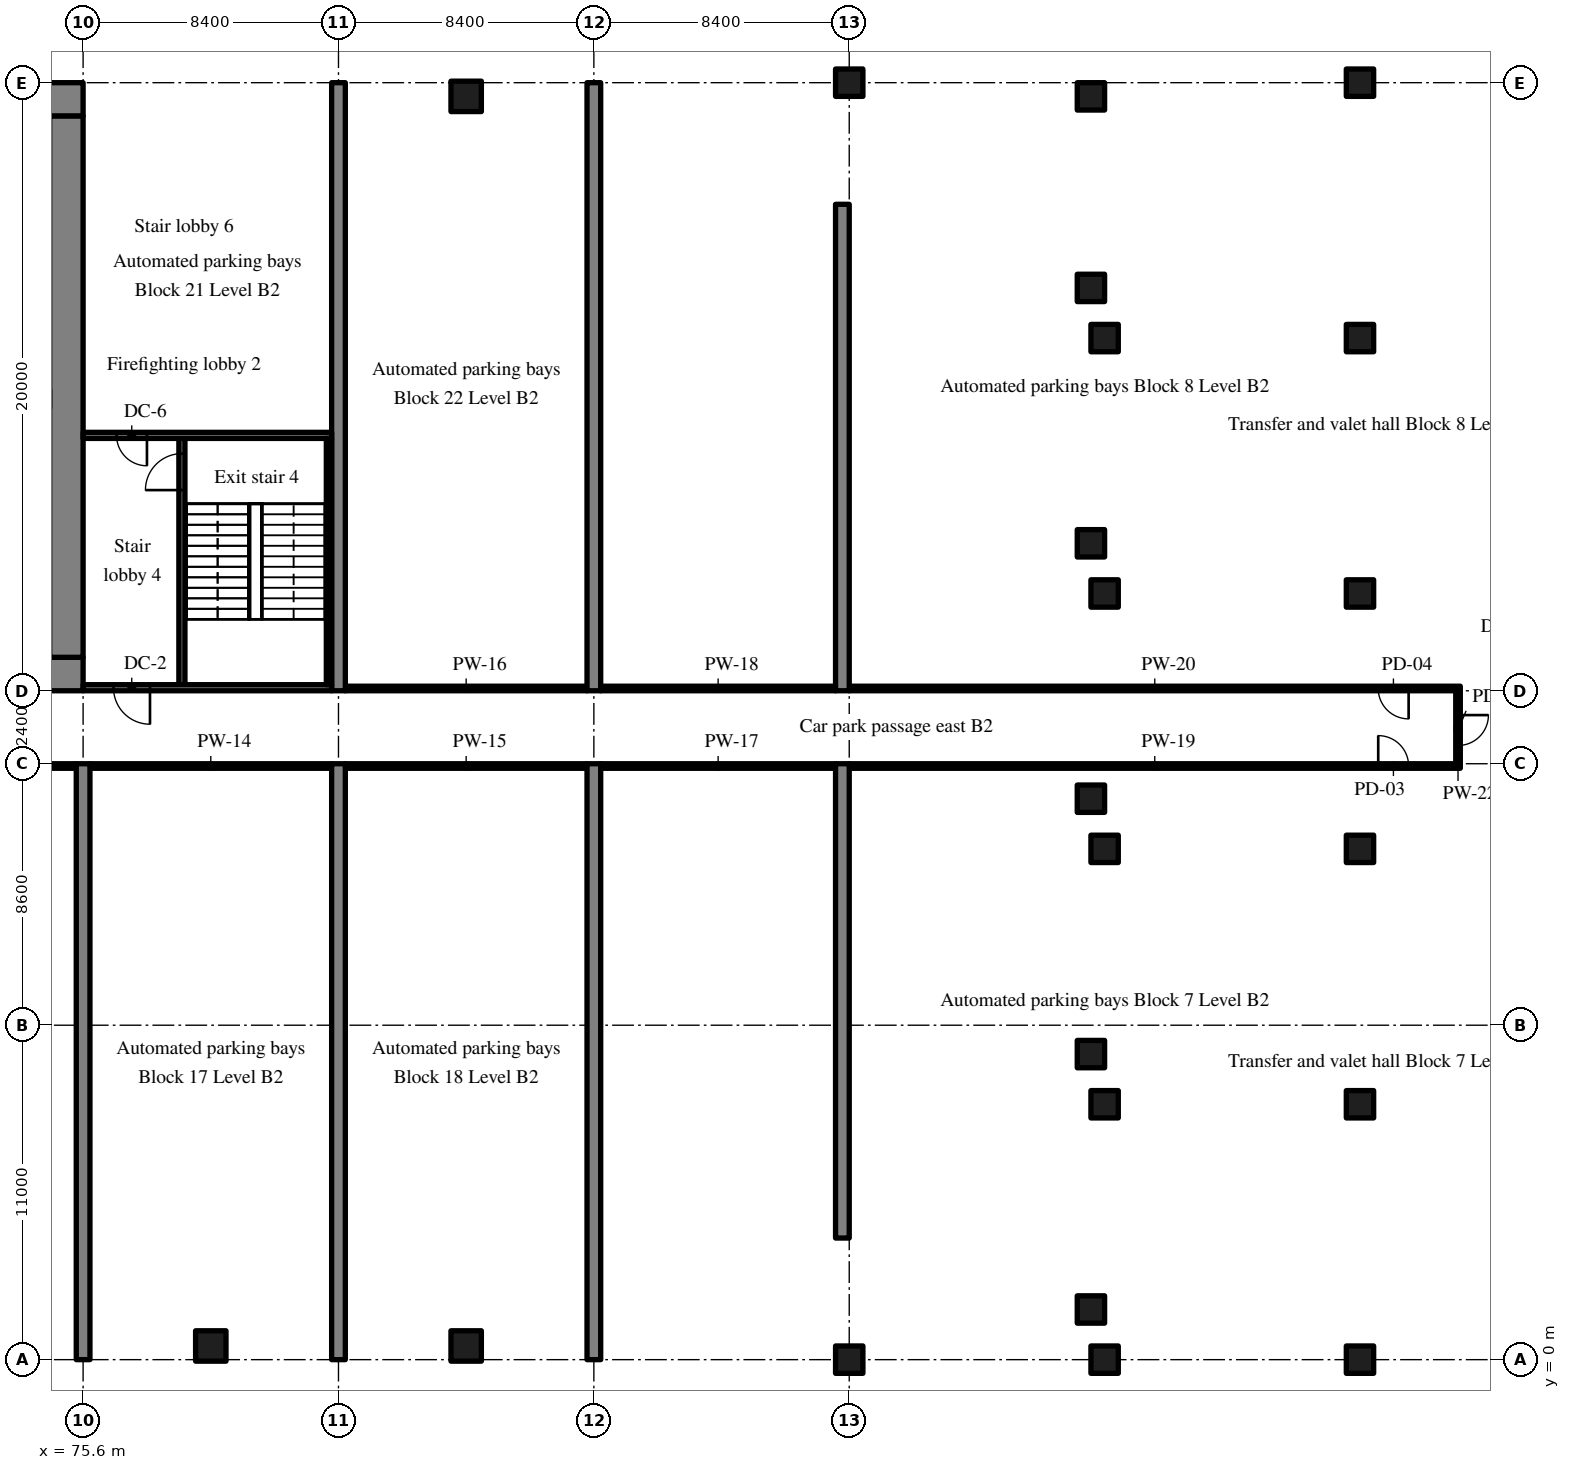
"""IFC4 building model, lengths in metres.
Left out: names, types, materials, properties, quantities, classifications, styles, units other than length and angle.
Written with IfcOpenShell. Run it as: python <this file> out.ifc"""

import sys

from ifc_helpers import new_model, si_unit, direction, frame, frame_2d, origin, origin_2d, place, context, subcontext, project, spatial, rectangle, extrude, source, transform, mapped, element, fill, save


model = new_model("IFC4")
c1 = context("Model", 3, precision=1e-05, world=origin(), true_north=direction((0.0, 1.0)))
c2 = subcontext(c1, "Body", "Model", "MODEL_VIEW")
j1 = project(units=[si_unit("LENGTHUNIT", "METRE"), si_unit("PLANEANGLEUNIT", "RADIAN")], contexts=[c1])
p1 = place(None, origin())
s1 = spatial("IfcSite", under=j1, at=p1, CompositionType="ELEMENT")
p2 = place(p1, origin())
s2 = spatial("IfcBuilding", under=s1, at=p2, CompositionType="ELEMENT")
p3 = place(p2, frame((0.0, 0.0, -9.0)))
s3 = spatial("IfcBuildingStorey", under=s2, at=p3, CompositionType="ELEMENT", Elevation=-9.0)
m1 = source(origin(), c2, "Body", "SweptSolid", [
    extrude(rectangle(XDim=50.4, YDim=1.1, at=frame_2d((25.2, 0.0))), origin(), (0.0, 0.0, 1.0), 4.22),
])
p4 = place(p3, frame((25.2, 22.55, 0.0), z_axis=(0.0, 0.0, 1.0), x_axis=(1.0, 0.0, 0.0)))
e1 = element("IfcWall", 1, at=p4, inside=s3, PredefinedType="SHEAR", context=c2, shape_type="MappedRepresentation", body=[
    mapped(m1, transform((0.0, 0.0, 0.0), scale=1.0)),
])
m2 = source(origin(), c2, "Body", "SweptSolid", [
    extrude(rectangle(XDim=1.8, YDim=2.1, at=frame_2d((0.9, 1.05))), frame((0.0, 0.56, 0.0), z_axis=(0.0, -1.0, 0.0), x_axis=(1.0, 0.0, 0.0)), (0.0, 0.0, 1.0), 1.12),
])
p5 = place(p4, frame((15.9, 0.0, 0.0)))
e2 = element("IfcOpeningElement", 2, at=p5, cuts=e1, PredefinedType="OPENING", context=c2, shape_type="MappedRepresentation", body=[
    mapped(m2, transform((0.0, 0.0, 0.0), scale=1.0)),
])
m3 = source(origin(), c2, "Body", "SweptSolid", [
    extrude(rectangle(XDim=1.2, YDim=2.1, at=frame_2d((0.6, 1.05))), frame((0.0, 0.56, 0.0), z_axis=(0.0, -1.0, 0.0), x_axis=(1.0, 0.0, 0.0)), (0.0, 0.0, 1.0), 1.12),
])
p6 = place(p4, frame((27.0, 0.0, 0.0)))
e3 = element("IfcOpeningElement", 3, at=p6, cuts=e1, PredefinedType="OPENING", context=c2, shape_type="MappedRepresentation", body=[
    mapped(m3, transform((0.0, 0.0, 0.0), scale=1.0)),
])
m4 = source(origin(), c2, "Body", "SweptSolid", [
    extrude(rectangle(XDim=0.9, YDim=2.1, at=frame_2d((0.45, 1.05))), frame((0.0, 0.56, 0.0), z_axis=(0.0, -1.0, 0.0), x_axis=(1.0, 0.0, 0.0)), (0.0, 0.0, 1.0), 1.12),
])
p7 = place(p4, frame((33.75, 0.0, 0.0)))
e4 = element("IfcOpeningElement", 4, at=p7, cuts=e1, PredefinedType="OPENING", context=c2, shape_type="MappedRepresentation", body=[
    mapped(m4, transform((0.0, 0.0, 0.0), scale=1.0)),
])
p8 = place(p4, frame((30.75, 0.0, 0.0)))
e5 = element("IfcOpeningElement", 5, at=p8, cuts=e1, PredefinedType="OPENING", context=c2, shape_type="MappedRepresentation", body=[
    mapped(m4, transform((0.0, 0.0, 0.0), scale=1.0)),
])
p9 = place(p4, frame((38.25, 0.0, 0.0)))
e6 = element("IfcOpeningElement", 6, at=p9, cuts=e1, PredefinedType="OPENING", context=c2, shape_type="MappedRepresentation", body=[
    mapped(m4, transform((0.0, 0.0, 0.0), scale=1.0)),
])
p10 = place(p4, frame((6.425, 0.0, 0.0)))
e7 = element("IfcOpeningElement", 7, at=p10, cuts=e1, PredefinedType="OPENING", context=c2, shape_type="MappedRepresentation", body=[
    mapped(m3, transform((0.0, 0.0, 0.0), scale=1.0)),
])
p11 = place(p4, frame((47.675, 0.0, 0.0)))
e8 = element("IfcOpeningElement", 8, at=p11, cuts=e1, PredefinedType="OPENING", context=c2, shape_type="MappedRepresentation", body=[
    mapped(m3, transform((0.0, 0.0, 0.0), scale=1.0)),
])
p12 = place(p3, frame((25.2, 41.45, 0.0), z_axis=(0.0, 0.0, 1.0), x_axis=(1.0, 0.0, 0.0)))
e9 = element("IfcWall", 9, at=p12, inside=s3, PredefinedType="SHEAR", context=c2, shape_type="MappedRepresentation", body=[
    mapped(m1, transform((0.0, 0.0, 0.0), scale=1.0)),
])
m5 = source(origin(), c2, "Body", "SweptSolid", [
    extrude(rectangle(XDim=17.8, YDim=1.1, at=frame_2d((8.9, 0.0))), origin(), (0.0, 0.0, 1.0), 4.22),
])
p13 = place(p3, frame((75.05, 23.1, 0.0), z_axis=(0.0, 0.0, 1.0), x_axis=(0.0, 1.0, 0.0)))
e10 = element("IfcWall", 10, at=p13, inside=s3, PredefinedType="SHEAR", context=c2, shape_type="MappedRepresentation", body=[
    mapped(m5, transform((0.0, 0.0, 0.0), scale=1.0)),
])
m6 = source(origin(), c2, "Body", "SweptSolid", [
    extrude(rectangle(XDim=19.6, YDim=0.45, at=frame_2d((9.8, 0.0))), origin(), (0.0, 0.0, 1.0), 4.22),
])
for number, where, z_axis, x_axis in (
    (11, (75.6, 0.0, 0.0), (0.0, 0.0, 1.0), (0.0, 1.0, 0.0)),
    (12, (84.0, 0.0, 0.0), (0.0, 0.0, 1.0), (0.0, 1.0, 0.0)),
):
    element("IfcWall", number, at=place(p3, frame(where, z_axis=z_axis, x_axis=x_axis)), inside=s3, PredefinedType="SHEAR", context=c2, shape_type="MappedRepresentation", body=[
        mapped(m6, transform((0.0, 0.0, 0.0), scale=1.0)),
    ])
m7 = source(origin(), c2, "Body", "SweptSolid", [
    extrude(rectangle(XDim=20.0, YDim=0.45, at=frame_2d((10.0, 0.0))), origin(), (0.0, 0.0, 1.0), 4.22),
])
p14 = place(p3, frame((84.0, 22.0, 0.0), z_axis=(0.0, 0.0, 1.0), x_axis=(0.0, 1.0, 0.0)))
e13 = element("IfcWall", 13, at=p14, inside=s3, PredefinedType="SHEAR", context=c2, shape_type="MappedRepresentation", body=[
    mapped(m7, transform((0.0, 0.0, 0.0), scale=1.0)),
])
p15 = place(p3, frame((92.4, 0.0, 0.0), z_axis=(0.0, 0.0, 1.0), x_axis=(0.0, 1.0, 0.0)))
e14 = element("IfcWall", 14, at=p15, inside=s3, PredefinedType="SHEAR", context=c2, shape_type="MappedRepresentation", body=[
    mapped(m6, transform((0.0, 0.0, 0.0), scale=1.0)),
])
p16 = place(p3, frame((92.4, 22.0, 0.0), z_axis=(0.0, 0.0, 1.0), x_axis=(0.0, 1.0, 0.0)))
e15 = element("IfcWall", 15, at=p16, inside=s3, PredefinedType="SHEAR", context=c2, shape_type="MappedRepresentation", body=[
    mapped(m7, transform((0.0, 0.0, 0.0), scale=1.0)),
])
m8 = source(origin(), c2, "Body", "SweptSolid", [
    extrude(rectangle(XDim=15.6, YDim=0.45, at=frame_2d((7.8, 0.0))), origin(), (0.0, 0.0, 1.0), 4.22),
])
p17 = place(p3, frame((100.575, 4.0, 0.0), z_axis=(0.0, 0.0, 1.0), x_axis=(0.0, 1.0, 0.0)))
e16 = element("IfcWall", 16, at=p17, inside=s3, PredefinedType="SHEAR", context=c2, shape_type="MappedRepresentation", body=[
    mapped(m8, transform((0.0, 0.0, 0.0), scale=1.0)),
])
m9 = source(origin(), c2, "Body", "SweptSolid", [
    extrude(rectangle(XDim=16.0, YDim=0.45, at=frame_2d((8.0, 0.0))), origin(), (0.0, 0.0, 1.0), 4.22),
])
p18 = place(p3, frame((100.575, 22.0, 0.0), z_axis=(0.0, 0.0, 1.0), x_axis=(0.0, 1.0, 0.0)))
e17 = element("IfcWall", 17, at=p18, inside=s3, PredefinedType="SHEAR", context=c2, shape_type="MappedRepresentation", body=[
    mapped(m9, transform((0.0, 0.0, 0.0), scale=1.0)),
])
m10 = source(origin(), c2, "Body", "SweptSolid", [
    extrude(rectangle(XDim=1.0, YDim=1.0, at=origin_2d()), origin(), (0.0, 0.0, 1.0), 4.22),
])
for number, where, z_axis, x_axis in (
    (18, (79.8, 0.45, 0.0), (0.0, 0.0, 1.0), (1.0, 0.0, 0.0)),
    (19, (88.2, 0.45, 0.0), (0.0, 0.0, 1.0), (1.0, 0.0, 0.0)),
    (20, (88.2, 41.55, 0.0), (0.0, 0.0, 1.0), (1.0, 0.0, 0.0)),
):
    element("IfcColumn", number, at=place(p3, frame(where, z_axis=z_axis, x_axis=x_axis)), inside=s3, PredefinedType="COLUMN", context=c2, shape_type="MappedRepresentation", body=[
        mapped(m10, transform((0.0, 0.0, 0.0), scale=1.0)),
    ])
m11 = source(origin(), c2, "Body", "SweptSolid", [
    extrude(rectangle(XDim=0.9, YDim=0.9, at=origin_2d()), origin(), (0.0, 0.0, 1.0), 4.22),
])
for number, where, z_axis, x_axis in (
    (21, (108.75, 1.65, 0.0), (0.0, 0.0, 1.0), (1.0, 0.0, 0.0)),
    (22, (108.75, 10.05, 0.0), (0.0, 0.0, 1.0), (1.0, 0.0, 0.0)),
    (23, (108.75, 18.45, 0.0), (0.0, 0.0, 1.0), (1.0, 0.0, 0.0)),
    (24, (108.75, 26.85, 0.0), (0.0, 0.0, 1.0), (1.0, 0.0, 0.0)),
    (25, (108.75, 35.25, 0.0), (0.0, 0.0, 1.0), (1.0, 0.0, 0.0)),
    (26, (108.75, 41.55, 0.0), (0.0, 0.0, 1.0), (1.0, 0.0, 0.0)),
    (27, (100.8, 0.0, 0.0), (0.0, 0.0, 1.0), (1.0, 0.0, 0.0)),
    (28, (100.8, 42.0, 0.0), (0.0, 0.0, 1.0), (1.0, 0.0, 0.0)),
    (29, (109.2, 0.0, 0.0), (0.0, 0.0, 1.0), (1.0, 0.0, 0.0)),
    (30, (109.2, 8.4, 0.0), (0.0, 0.0, 1.0), (1.0, 0.0, 0.0)),
    (31, (109.2, 16.8, 0.0), (0.0, 0.0, 1.0), (1.0, 0.0, 0.0)),
    (32, (109.2, 25.2, 0.0), (0.0, 0.0, 1.0), (1.0, 0.0, 0.0)),
    (33, (109.2, 33.6, 0.0), (0.0, 0.0, 1.0), (1.0, 0.0, 0.0)),
    (34, (117.6, 0.0, 0.0), (0.0, 0.0, 1.0), (1.0, 0.0, 0.0)),
    (35, (117.6, 8.4, 0.0), (0.0, 0.0, 1.0), (1.0, 0.0, 0.0)),
    (36, (117.6, 16.8, 0.0), (0.0, 0.0, 1.0), (1.0, 0.0, 0.0)),
    (37, (117.6, 25.2, 0.0), (0.0, 0.0, 1.0), (1.0, 0.0, 0.0)),
    (38, (117.6, 33.6, 0.0), (0.0, 0.0, 1.0), (1.0, 0.0, 0.0)),
    (39, (117.6, 42.0, 0.0), (0.0, 0.0, 1.0), (1.0, 0.0, 0.0)),
):
    element("IfcColumn", number, at=place(p3, frame(where, z_axis=z_axis, x_axis=x_axis)), inside=s3, PredefinedType="COLUMN", context=c2, shape_type="MappedRepresentation", body=[
        mapped(m11, transform((0.0, 0.0, 0.0), scale=1.0)),
    ])
m12 = source(origin(), c2, "Body", "SweptSolid", [
    extrude(rectangle(XDim=8.3, YDim=0.2, at=frame_2d((4.15, 0.0))), origin(), (0.0, 0.0, 1.0), 4.22),
])
p19 = place(p3, frame((78.85, 22.1, 0.0), z_axis=(0.0, 0.0, 1.0), x_axis=(0.0, 1.0, 0.0)))
e40 = element("IfcWall", 40, at=p19, inside=s3, PredefinedType="SOLIDWALL", context=c2, shape_type="MappedRepresentation", body=[
    mapped(m12, transform((0.0, 0.0, 0.0), scale=1.0)),
])
m13 = source(origin(), c2, "Body", "SweptSolid", [
    extrude(rectangle(XDim=1.2, YDim=2.1, at=frame_2d((0.6, 1.05))), frame((0.0, 0.11, 0.0), z_axis=(0.0, -1.0, 0.0), x_axis=(1.0, 0.0, 0.0)), (0.0, 0.0, 1.0), 0.22),
])
p20 = place(p19, frame((6.5, 0.0, 0.0)))
e41 = element("IfcOpeningElement", 41, at=p20, cuts=e40, PredefinedType="OPENING", context=c2, shape_type="MappedRepresentation", body=[
    mapped(m13, transform((0.0, 0.0, 0.0), scale=1.0)),
])
m14 = source(origin(), c2, "Body", "SweptSolid", [
    extrude(rectangle(XDim=8.175, YDim=0.2, at=frame_2d((4.087, 0.0))), origin(), (0.0, 0.0, 1.0), 4.22),
])
p21 = place(p3, frame((83.775, 22.1, 0.0), z_axis=(0.0, 0.0, 1.0), x_axis=(-1.0, 0.0, 0.0)))
e42 = element("IfcWall", 42, at=p21, inside=s3, PredefinedType="SOLIDWALL", context=c2, shape_type="MappedRepresentation", body=[
    mapped(m14, transform((0.0, 0.0, 0.0), scale=1.0)),
])
p22 = place(p21, frame((5.975, 0.0, 0.0)))
e43 = element("IfcOpeningElement", 43, at=p22, cuts=e42, PredefinedType="OPENING", context=c2, shape_type="MappedRepresentation", body=[
    mapped(m13, transform((0.0, 0.0, 0.0), scale=1.0)),
])
p23 = place(p3, frame((83.775, 30.4, 0.0), z_axis=(0.0, 0.0, 1.0), x_axis=(-1.0, 0.0, 0.0)))
e44 = element("IfcWall", 44, at=p23, inside=s3, PredefinedType="SOLIDWALL", context=c2, shape_type="MappedRepresentation", body=[
    mapped(m14, transform((0.0, 0.0, 0.0), scale=1.0)),
])
m15 = source(origin(), c2, "Body", "SweptSolid", [
    extrude(rectangle(XDim=1.0, YDim=2.1, at=frame_2d((0.5, 1.05))), frame((0.0, 0.11, 0.0), z_axis=(0.0, -1.0, 0.0), x_axis=(1.0, 0.0, 0.0)), (0.0, 0.0, 1.0), 0.22),
])
p24 = place(p23, frame((6.075, 0.0, 0.0)))
e45 = element("IfcOpeningElement", 45, at=p24, cuts=e44, PredefinedType="OPENING", context=c2, shape_type="MappedRepresentation", body=[
    mapped(m15, transform((0.0, 0.0, 0.0), scale=1.0)),
])
m16 = source(origin(), c2, "Body", "SweptSolid", [
    extrude(rectangle(XDim=8.1, YDim=0.175, at=frame_2d((4.05, 0.0))), origin(), (0.0, 0.0, 1.0), 4.22),
])
p25 = place(p3, frame((83.688, 22.2, 0.0), z_axis=(0.0, 0.0, 1.0), x_axis=(0.0, 1.0, 0.0)))
e46 = element("IfcWall", 46, at=p25, inside=s3, PredefinedType="SOLIDWALL", context=c2, shape_type="MappedRepresentation", body=[
    mapped(m16, transform((0.0, 0.0, 0.0), scale=1.0)),
])
m17 = source(origin(), c2, "Body", "SweptSolid", [
    extrude(rectangle(XDim=7.95, YDim=0.15, at=frame_2d((3.975, 0.0))), origin(), (0.0, 0.0, 1.0), 4.22),
])
for number, where, z_axis, x_axis in (
    (47, (67.425, 19.525, 0.0), (0.0, 0.0, 1.0), (1.0, 0.0, 0.0)),
    (48, (75.825, 19.525, 0.0), (0.0, 0.0, 1.0), (1.0, 0.0, 0.0)),
    (49, (84.225, 19.525, 0.0), (0.0, 0.0, 1.0), (1.0, 0.0, 0.0)),
    (50, (84.225, 22.075, 0.0), (0.0, 0.0, 1.0), (1.0, 0.0, 0.0)),
):
    element("IfcWall", number, at=place(p3, frame(where, z_axis=z_axis, x_axis=x_axis)), inside=s3, PredefinedType="PARTITIONING", context=c2, shape_type="MappedRepresentation", body=[
        mapped(m17, transform((0.0, 0.0, 0.0), scale=1.0)),
    ])
m18 = source(origin(), c2, "Body", "SweptSolid", [
    extrude(rectangle(XDim=7.725, YDim=0.15, at=frame_2d((3.863, 0.0))), origin(), (0.0, 0.0, 1.0), 4.22),
])
for number, where, z_axis, x_axis in (
    (51, (92.625, 19.525, 0.0), (0.0, 0.0, 1.0), (1.0, 0.0, 0.0)),
    (52, (92.625, 22.075, 0.0), (0.0, 0.0, 1.0), (1.0, 0.0, 0.0)),
):
    element("IfcWall", number, at=place(p3, frame(where, z_axis=z_axis, x_axis=x_axis)), inside=s3, PredefinedType="PARTITIONING", context=c2, shape_type="MappedRepresentation", body=[
        mapped(m18, transform((0.0, 0.0, 0.0), scale=1.0)),
    ])
m19 = source(origin(), c2, "Body", "SweptSolid", [
    extrude(rectangle(XDim=20.1, YDim=0.15, at=frame_2d((10.05, 0.0))), origin(), (0.0, 0.0, 1.0), 4.22),
])
p26 = place(p3, frame((100.8, 19.525, 0.0), z_axis=(0.0, 0.0, 1.0), x_axis=(1.0, 0.0, 0.0)))
e53 = element("IfcWall", 53, at=p26, inside=s3, PredefinedType="PARTITIONING", context=c2, shape_type="MappedRepresentation", body=[
    mapped(m19, transform((0.0, 0.0, 0.0), scale=1.0)),
])
m20 = source(origin(), c2, "Body", "SweptSolid", [
    extrude(rectangle(XDim=1.0, YDim=2.1, at=frame_2d((0.5, 1.05))), frame((0.0, 0.085, 0.0), z_axis=(0.0, -1.0, 0.0), x_axis=(1.0, 0.0, 0.0)), (0.0, 0.0, 1.0), 0.17),
])
p27 = place(p26, frame((17.4, 0.0, 0.0)))
e54 = element("IfcOpeningElement", 54, at=p27, cuts=e53, PredefinedType="OPENING", context=c2, shape_type="MappedRepresentation", body=[
    mapped(m20, transform((0.0, 0.0, 0.0), scale=1.0)),
])
p28 = place(p3, frame((100.8, 22.075, 0.0), z_axis=(0.0, 0.0, 1.0), x_axis=(1.0, 0.0, 0.0)))
e55 = element("IfcWall", 55, at=p28, inside=s3, PredefinedType="PARTITIONING", context=c2, shape_type="MappedRepresentation", body=[
    mapped(m19, transform((0.0, 0.0, 0.0), scale=1.0)),
])
p29 = place(p28, frame((17.4, 0.0, 0.0)))
e56 = element("IfcOpeningElement", 56, at=p29, cuts=e55, PredefinedType="OPENING", context=c2, shape_type="MappedRepresentation", body=[
    mapped(m20, transform((0.0, 0.0, 0.0), scale=1.0)),
])
m21 = source(origin(), c2, "Body", "SweptSolid", [
    extrude(rectangle(XDim=2.4, YDim=0.15, at=frame_2d((1.2, 0.0))), origin(), (0.0, 0.0, 1.0), 4.22),
])
p30 = place(p3, frame((120.825, 19.6, 0.0), z_axis=(0.0, 0.0, 1.0), x_axis=(0.0, 1.0, 0.0)))
e57 = element("IfcWall", 57, at=p30, inside=s3, PredefinedType="PARTITIONING", context=c2, shape_type="MappedRepresentation", body=[
    mapped(m21, transform((0.0, 0.0, 0.0), scale=1.0)),
])
p31 = place(p30, frame((0.6, 0.0, 0.0)))
e58 = element("IfcOpeningElement", 58, at=p31, cuts=e57, PredefinedType="OPENING", context=c2, shape_type="MappedRepresentation", body=[
    mapped(m20, transform((0.0, 0.0, 0.0), scale=1.0)),
])
m22 = source(origin(), c2, "Body", "SweptSolid", [
    extrude(rectangle(XDim=1.2, YDim=2.1, at=frame_2d((0.6, 1.05))), frame((0.0, 0.025, 0.0), z_axis=(0.0, -1.0, 0.0), x_axis=(1.0, 0.0, 0.0)), (0.0, 0.0, 1.0), 0.05),
])
p32 = place(p20, origin())
e59 = element("IfcDoor", 59, at=p32, inside=s3, OperationType="SINGLE_SWING_LEFT", PredefinedType="DOOR", context=c2, shape_type="MappedRepresentation", body=[
    mapped(m22, transform((0.0, 0.0, 0.0), scale=1.0)),
])
fill(e41, e59)
p33 = place(p22, origin())
e60 = element("IfcDoor", 60, at=p33, inside=s3, OperationType="SINGLE_SWING_LEFT", PredefinedType="DOOR", context=c2, shape_type="MappedRepresentation", body=[
    mapped(m22, transform((0.0, 0.0, 0.0), scale=1.0)),
])
fill(e43, e60)
m23 = source(origin(), c2, "Body", "SweptSolid", [
    extrude(rectangle(XDim=1.0, YDim=2.1, at=frame_2d((0.5, 1.05))), frame((0.0, 0.025, 0.0), z_axis=(0.0, -1.0, 0.0), x_axis=(1.0, 0.0, 0.0)), (0.0, 0.0, 1.0), 0.05),
])
p34 = place(p24, origin())
e61 = element("IfcDoor", 61, at=p34, inside=s3, OperationType="SINGLE_SWING_LEFT", PredefinedType="DOOR", context=c2, shape_type="MappedRepresentation", body=[
    mapped(m23, transform((0.0, 0.0, 0.0), scale=1.0)),
])
fill(e45, e61)
p35 = place(p27, origin())
e62 = element("IfcDoor", 62, at=p35, inside=s3, OperationType="SINGLE_SWING_LEFT", PredefinedType="DOOR", context=c2, shape_type="MappedRepresentation", body=[
    mapped(m23, transform((0.0, 0.0, 0.0), scale=1.0)),
])
fill(e54, e62)
p36 = place(p29, origin())
e63 = element("IfcDoor", 63, at=p36, inside=s3, OperationType="SINGLE_SWING_RIGHT", PredefinedType="DOOR", context=c2, shape_type="MappedRepresentation", body=[
    mapped(m23, transform((0.0, 0.0, 0.0), scale=1.0)),
])
fill(e56, e63)
p37 = place(p31, origin())
e64 = element("IfcDoor", 64, at=p37, inside=s3, OperationType="SINGLE_SWING_RIGHT", PredefinedType="DOOR", context=c2, shape_type="MappedRepresentation", body=[
    mapped(m23, transform((0.0, 0.0, 0.0), scale=1.0)),
])
fill(e58, e64)
save(model, sys.argv[1])
